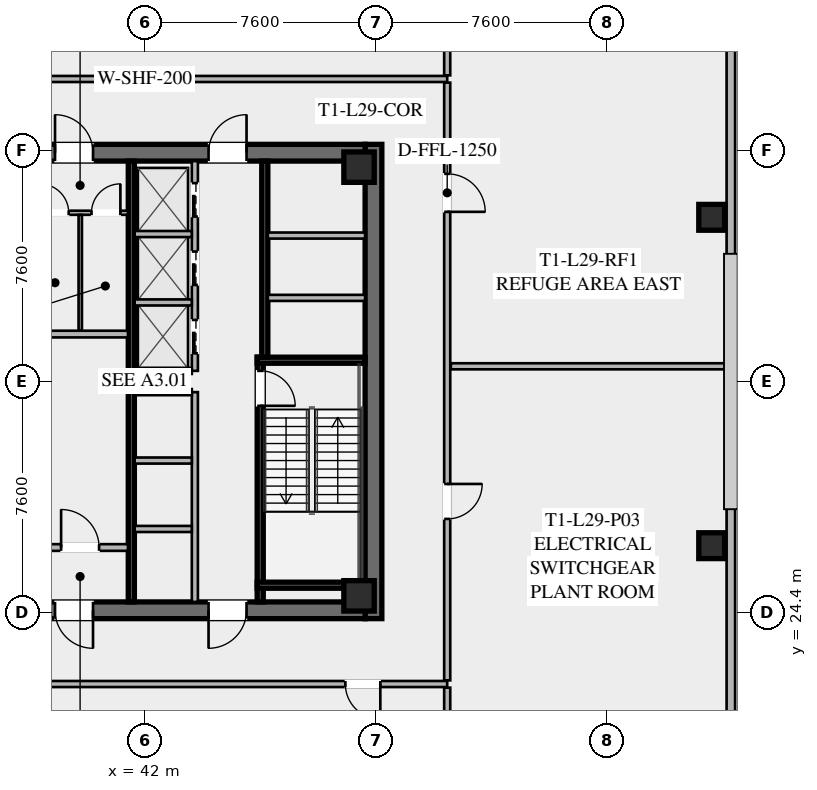
"""IFC4 building model, lengths in metres.
Left out: names, types, materials, properties, quantities, classifications, styles, units other than length and angle.
Written with IfcOpenShell. Run it as: python <this file> out.ifc"""

import sys

from ifc_helpers import new_model, si_unit, direction, frame, frame_2d, origin, origin_2d, place, context, subcontext, project, spatial, rectangle, hollow_rectangle, extrude, element, fill, save


model = new_model("IFC4")
c1 = context("Model", 3, precision=1e-05, world=origin(), true_north=direction((0.0, 1.0)))
c2 = subcontext(c1, "Body", "Model", "MODEL_VIEW")
j1 = project(units=[si_unit("LENGTHUNIT", "METRE"), si_unit("PLANEANGLEUNIT", "RADIAN")], contexts=[c1])
p1 = place(None, origin())
s1 = spatial("IfcSite", under=j1, at=p1, CompositionType="ELEMENT")
p2 = place(p1, origin())
s2 = spatial("IfcBuilding", under=s1, at=p2, CompositionType="ELEMENT")
p3 = place(p2, frame((0.0, 0.0, 109.8)))
s3 = spatial("IfcBuildingStorey", under=s2, at=p3, CompositionType="ELEMENT", Elevation=109.8)
p4 = place(p3, frame((49.525, 39.8, 0.0), z_axis=(0.0, 0.0, 1.0), x_axis=(0.0, -1.0, 0.0)))
e1 = element("IfcWall", 1, at=p4, inside=s3, PredefinedType="SHEAR", context=c2, shape_type="SweptSolid", body=[
    extrude(rectangle(XDim=15.6, YDim=0.55, at=frame_2d((7.8, 0.0))), origin(), (0.0, 0.0, 1.0), 4.6),
])
p5 = place(p3, frame((49.25, 24.475, 0.0), z_axis=(0.0, 0.0, 1.0), x_axis=(-1.0, 0.0, 0.0)))
e2 = element("IfcWall", 2, at=p5, inside=s3, PredefinedType="SHEAR", context=c2, shape_type="SweptSolid", body=[
    extrude(rectangle(XDim=14.5, YDim=0.55, at=frame_2d((7.25, 0.0))), origin(), (0.0, 0.0, 1.0), 4.6),
])
p6 = place(p5, frame((8.95, 0.0, 0.0)))
e3 = element("IfcOpeningElement", 3, at=p6, cuts=e2, PredefinedType="OPENING", context=c2, shape_type="SweptSolid", body=[
    extrude(rectangle(XDim=1.25, YDim=2.25, at=frame_2d((0.625, 1.125))), frame((0.0, 0.285, 0.0), z_axis=(0.0, -1.0, 0.0), x_axis=(1.0, 0.0, 0.0)), (0.0, 0.0, 1.0), 0.57),
])
p7 = place(p5, frame((3.9, 0.0, 0.0)))
e4 = element("IfcOpeningElement", 4, at=p7, cuts=e2, PredefinedType="OPENING", context=c2, shape_type="SweptSolid", body=[
    extrude(rectangle(XDim=1.25, YDim=2.25, at=frame_2d((0.625, 1.125))), frame((0.0, 0.285, 0.0), z_axis=(0.0, -1.0, 0.0), x_axis=(1.0, 0.0, 0.0)), (0.0, 0.0, 1.0), 0.57),
])
p8 = place(p3, frame((34.75, 39.525, 0.0), z_axis=(0.0, 0.0, 1.0), x_axis=(1.0, 0.0, 0.0)))
e5 = element("IfcWall", 5, at=p8, inside=s3, PredefinedType="SHEAR", context=c2, shape_type="SweptSolid", body=[
    extrude(rectangle(XDim=14.5, YDim=0.55, at=frame_2d((7.25, 0.0))), origin(), (0.0, 0.0, 1.0), 4.6),
])
p9 = place(p8, frame((4.3, 0.0, 0.0)))
e6 = element("IfcOpeningElement", 6, at=p9, cuts=e5, PredefinedType="OPENING", context=c2, shape_type="SweptSolid", body=[
    extrude(rectangle(XDim=1.25, YDim=2.25, at=frame_2d((0.625, 1.125))), frame((0.0, 0.285, 0.0), z_axis=(0.0, -1.0, 0.0), x_axis=(1.0, 0.0, 0.0)), (0.0, 0.0, 1.0), 0.57),
])
p10 = place(p8, frame((9.35, 0.0, 0.0)))
e7 = element("IfcOpeningElement", 7, at=p10, cuts=e5, PredefinedType="OPENING", context=c2, shape_type="SweptSolid", body=[
    extrude(rectangle(XDim=1.25, YDim=2.25, at=frame_2d((0.625, 1.125))), frame((0.0, 0.285, 0.0), z_axis=(0.0, -1.0, 0.0), x_axis=(1.0, 0.0, 0.0)), (0.0, 0.0, 1.0), 0.57),
])
for number, where, z_axis, x_axis in (
    (8, (49.05, 24.95, 0.0), (0.0, 0.0, 1.0), (1.0, 0.0, 0.0)),
    (9, (49.05, 39.05, 0.0), (0.0, 0.0, 1.0), (1.0, 0.0, 0.0)),
):
    element("IfcColumn", number, at=place(p3, frame(where, z_axis=z_axis, x_axis=x_axis)), inside=s3, PredefinedType="COLUMN", context=c2, shape_type="SweptSolid", body=[
        extrude(hollow_rectangle(XDim=1.0, YDim=1.0, WallThickness=0.04, at=origin_2d()), origin(), (0.0, 0.0, 1.0), 4.42),
    ])
for number, where, z_axis, x_axis in (
    (10, (60.65, 26.6, -0.295), (0.0, 0.0, 1.0), (1.0, 0.0, 0.0)),
    (11, (60.65, 37.4, -0.295), (0.0, 0.0, 1.0), (1.0, 0.0, 0.0)),
):
    element("IfcColumn", number, at=place(p3, frame(where, z_axis=z_axis, x_axis=x_axis)), inside=s3, PredefinedType="COLUMN", context=c2, shape_type="SweptSolid", body=[
        extrude(hollow_rectangle(XDim=0.85, YDim=0.85, WallThickness=0.035, at=origin_2d()), origin(), (0.0, 0.0, 1.0), 4.715),
    ])
p11 = place(p3, frame((61.28, 48.78, 0.0), z_axis=(0.0, 0.0, 1.0), x_axis=(0.0, -1.0, 0.0)))
e12 = element("IfcWall", 12, at=p11, inside=s3, PredefinedType="SOLIDWALL", context=c2, shape_type="SweptSolid", body=[
    extrude(rectangle(XDim=33.56, YDim=0.28, at=frame_2d((16.78, 0.0))), origin(), (0.0, 0.0, 1.0), 4.42),
])
p12 = place(p3, frame((45.8, 32.8, 0.0), z_axis=(0.0, 0.0, 1.0), x_axis=(0.0, -1.0, 0.0)))
e13 = element("IfcWall", 13, at=p12, inside=s3, PredefinedType="SHEAR", context=c2, shape_type="SweptSolid", body=[
    extrude(rectangle(XDim=8.05, YDim=0.2, at=frame_2d((4.025, 0.0))), origin(), (0.0, 0.0, 1.0), 4.42),
])
p13 = place(p12, frame((0.45, 0.0, 0.0)))
e14 = element("IfcOpeningElement", 14, at=p13, cuts=e13, PredefinedType="OPENING", context=c2, shape_type="SweptSolid", body=[
    extrude(rectangle(XDim=1.15, YDim=2.2, at=frame_2d((0.575, 1.1))), frame((0.0, 0.11, 0.0), z_axis=(0.0, -1.0, 0.0), x_axis=(1.0, 0.0, 0.0)), (0.0, 0.0, 1.0), 0.22),
])
for number, where, z_axis, x_axis in (
    (15, (45.7, 32.7, 0.0), (0.0, 0.0, 1.0), (1.0, 0.0, 0.0)),
    (16, (45.7, 25.3, 0.0), (0.0, 0.0, 1.0), (1.0, 0.0, 0.0)),
):
    element("IfcWall", number, at=place(p3, frame(where, z_axis=z_axis, x_axis=x_axis)), inside=s3, PredefinedType="SHEAR", context=c2, shape_type="SweptSolid", body=[
        extrude(rectangle(XDim=3.55, YDim=0.2, at=frame_2d((1.775, 0.0))), origin(), (0.0, 0.0, 1.0), 4.42),
    ])
p14 = place(p3, frame((41.56, 24.75, 0.0), z_axis=(0.0, 0.0, 1.0), x_axis=(0.0, 1.0, 0.0)))
e17 = element("IfcWall", 17, at=p14, inside=s3, PredefinedType="SHEAR", context=c2, shape_type="SweptSolid", body=[
    extrude(rectangle(XDim=14.5, YDim=0.2, at=frame_2d((7.25, 0.0))), origin(), (0.0, 0.0, 1.0), 4.42),
])
p15 = place(p3, frame((38.3, 33.56, 0.0), z_axis=(0.0, 0.0, 1.0), x_axis=(1.0, 0.0, 0.0)))
e18 = element("IfcWall", 18, at=p15, inside=s3, PredefinedType="SOLIDWALL", context=c2, shape_type="SweptSolid", body=[
    extrude(rectangle(XDim=3.15, YDim=0.22, at=frame_2d((1.575, 0.0))), origin(), (0.0, 0.0, 1.0), 3.531),
])
p16 = place(p3, frame((38.3, 26.54, 0.0), z_axis=(0.0, 0.0, 1.0), x_axis=(1.0, 0.0, 0.0)))
e19 = element("IfcWall", 19, at=p16, inside=s3, PredefinedType="SOLIDWALL", context=c2, shape_type="SweptSolid", body=[
    extrude(rectangle(XDim=3.15, YDim=0.22, at=frame_2d((1.575, 0.0))), origin(), (0.0, 0.0, 1.0), 3.531),
])
p17 = place(p16, frame((0.95, 0.0, 0.0)))
e20 = element("IfcOpeningElement", 20, at=p17, cuts=e19, PredefinedType="OPENING", context=c2, shape_type="SweptSolid", body=[
    extrude(rectangle(XDim=1.25, YDim=2.25, at=frame_2d((0.625, 1.125))), frame((0.0, 0.12, 0.0), z_axis=(0.0, -1.0, 0.0), x_axis=(1.0, 0.0, 0.0)), (0.0, 0.0, 1.0), 0.24),
])
p18 = place(p3, frame((45.95, 39.25, 0.0), z_axis=(0.0, 0.0, 1.0), x_axis=(0.0, -1.0, 0.0)))
e21 = element("IfcWall", 21, at=p18, inside=s3, PredefinedType="SHEAR", context=c2, shape_type="SweptSolid", body=[
    extrude(rectangle(XDim=6.45, YDim=0.2, at=frame_2d((3.225, 0.0))), origin(), (0.0, 0.0, 1.0), 4.42),
])
for number, where, z_axis, x_axis in (
    (22, (46.05, 34.75, 0.0), (0.0, 0.0, 1.0), (1.0, 0.0, 0.0)),
    (23, (46.05, 36.8, 0.0), (0.0, 0.0, 1.0), (1.0, 0.0, 0.0)),
):
    element("IfcWall", number, at=place(p3, frame(where, z_axis=z_axis, x_axis=x_axis)), inside=s3, PredefinedType="SOLIDWALL", context=c2, shape_type="SweptSolid", body=[
        extrude(rectangle(XDim=3.2, YDim=0.2, at=frame_2d((1.6, 0.0))), origin(), (0.0, 0.0, 1.0), 4.42),
    ])
p19 = place(p3, frame((38.3, 37.55, 0.0), z_axis=(0.0, 0.0, 1.0), x_axis=(1.0, 0.0, 0.0)))
e24 = element("IfcWall", 24, at=p19, inside=s3, PredefinedType="PARTITIONING", context=c2, shape_type="SweptSolid", body=[
    extrude(rectangle(XDim=3.15, YDim=0.135, at=frame_2d((1.575, 0.0))), origin(), (0.0, 0.0, 1.0), 3.531),
])
p20 = place(p19, frame((0.25, 0.0, 0.0)))
e25 = element("IfcOpeningElement", 25, at=p20, cuts=e24, PredefinedType="OPENING", context=c2, shape_type="SweptSolid", body=[
    extrude(rectangle(XDim=0.95, YDim=2.05, at=frame_2d((0.475, 1.025))), frame((0.0, 0.077, 0.0), z_axis=(0.0, -1.0, 0.0), x_axis=(1.0, 0.0, 0.0)), (0.0, 0.0, 1.0), 0.155),
])
p21 = place(p19, frame((1.95, 0.0, 0.0)))
e26 = element("IfcOpeningElement", 26, at=p21, cuts=e24, PredefinedType="OPENING", context=c2, shape_type="SweptSolid", body=[
    extrude(rectangle(XDim=0.95, YDim=2.05, at=frame_2d((0.475, 1.025))), frame((0.0, 0.077, 0.0), z_axis=(0.0, -1.0, 0.0), x_axis=(1.0, 0.0, 0.0)), (0.0, 0.0, 1.0), 0.155),
])
p22 = place(p3, frame((39.88, 33.68, 0.0), z_axis=(0.0, 0.0, 1.0), x_axis=(0.0, 1.0, 0.0)))
e27 = element("IfcWall", 27, at=p22, inside=s3, PredefinedType="PARTITIONING", context=c2, shape_type="SweptSolid", body=[
    extrude(rectangle(XDim=3.8, YDim=0.11, at=frame_2d((1.9, 0.0))), origin(), (0.0, 0.0, 1.0), 3.531),
])
p23 = place(p3, frame((43.65, 24.75, 0.0), z_axis=(0.0, 0.0, 1.0), x_axis=(0.0, 1.0, 0.0)))
e28 = element("IfcWall", 28, at=p23, inside=s3, PredefinedType="SOLIDWALL", context=c2, shape_type="SweptSolid", body=[
    extrude(rectangle(XDim=6.9, YDim=0.2, at=frame_2d((3.45, 0.0))), origin(), (0.0, 0.0, 1.0), 4.42),
])
for number, where, z_axis, x_axis in (
    (29, (41.67, 27.15, 0.0), (0.0, 0.0, 1.0), (1.0, 0.0, 0.0)),
    (30, (41.67, 29.4, 0.0), (0.0, 0.0, 1.0), (1.0, 0.0, 0.0)),
    (31, (41.67, 31.65, 0.0), (0.0, 0.0, 1.0), (1.0, 0.0, 0.0)),
):
    element("IfcWall", number, at=place(p3, frame(where, z_axis=z_axis, x_axis=x_axis)), inside=s3, PredefinedType="SOLIDWALL", context=c2, shape_type="SweptSolid", body=[
        extrude(rectangle(XDim=1.88, YDim=0.2, at=frame_2d((0.94, 0.0))), origin(), (0.0, 0.0, 1.0), 4.42),
    ])
p24 = place(p3, frame((43.65, 32.35, 0.0), z_axis=(0.0, 0.0, 1.0), x_axis=(0.0, 1.0, 0.0)))
e32 = element("IfcWall", 32, at=p24, inside=s3, PredefinedType="SOLIDWALL", context=c2, shape_type="SweptSolid", body=[
    extrude(rectangle(XDim=6.9, YDim=0.2, at=frame_2d((3.45, 0.0))), origin(), (0.0, 0.0, 1.0), 4.42),
])
p25 = place(p24, frame((0.575, 0.0, 0.0)))
e33 = element("IfcOpeningElement", 33, at=p25, cuts=e32, PredefinedType="OPENING", context=c2, shape_type="SweptSolid", body=[
    extrude(rectangle(XDim=1.1, YDim=2.2, at=frame_2d((0.55, 1.1))), frame((0.0, 0.11, 0.0), z_axis=(0.0, -1.0, 0.0), x_axis=(1.0, 0.0, 0.0)), (0.0, 0.0, 1.0), 0.22),
])
p26 = place(p24, frame((2.825, 0.0, 0.0)))
e34 = element("IfcOpeningElement", 34, at=p26, cuts=e32, PredefinedType="OPENING", context=c2, shape_type="SweptSolid", body=[
    extrude(rectangle(XDim=1.1, YDim=2.2, at=frame_2d((0.55, 1.1))), frame((0.0, 0.11, 0.0), z_axis=(0.0, -1.0, 0.0), x_axis=(1.0, 0.0, 0.0)), (0.0, 0.0, 1.0), 0.22),
])
p27 = place(p24, frame((5.075, 0.0, 0.0)))
e35 = element("IfcOpeningElement", 35, at=p27, cuts=e32, PredefinedType="OPENING", context=c2, shape_type="SweptSolid", body=[
    extrude(rectangle(XDim=1.1, YDim=2.2, at=frame_2d((0.55, 1.1))), frame((0.0, 0.11, 0.0), z_axis=(0.0, -1.0, 0.0), x_axis=(1.0, 0.0, 0.0)), (0.0, 0.0, 1.0), 0.22),
])
for number, where, z_axis, x_axis in (
    (36, (41.67, 32.35, 0.0), (0.0, 0.0, 1.0), (1.0, 0.0, 0.0)),
    (37, (41.67, 34.6, 0.0), (0.0, 0.0, 1.0), (1.0, 0.0, 0.0)),
    (38, (41.67, 36.85, 0.0), (0.0, 0.0, 1.0), (1.0, 0.0, 0.0)),
):
    element("IfcWall", number, at=place(p3, frame(where, z_axis=z_axis, x_axis=x_axis)), inside=s3, PredefinedType="SOLIDWALL", context=c2, shape_type="SweptSolid", body=[
        extrude(rectangle(XDim=1.88, YDim=0.2, at=frame_2d((0.94, 0.0))), origin(), (0.0, 0.0, 1.0), 4.42),
    ])
p28 = place(p3, frame((32.05, 41.95, 0.0), z_axis=(0.0, 0.0, 1.0), x_axis=(1.0, 0.0, 0.0)))
e39 = element("IfcWall", 39, at=p28, inside=s3, PredefinedType="SOLIDWALL", context=c2, shape_type="SweptSolid", body=[
    extrude(rectangle(XDim=19.9, YDim=0.2, at=frame_2d((9.95, 0.0))), origin(), (0.0, 0.0, 1.0), 3.531),
])
p29 = place(p28, frame((2.2, 0.0, 0.0)))
e40 = element("IfcOpeningElement", 40, at=p29, cuts=e39, PredefinedType="OPENING", context=c2, shape_type="SweptSolid", body=[
    extrude(rectangle(XDim=1.15, YDim=2.2, at=frame_2d((0.575, 1.1))), frame((0.0, 0.11, 0.0), z_axis=(0.0, -1.0, 0.0), x_axis=(1.0, 0.0, 0.0)), (0.0, 0.0, 1.0), 0.22),
])
p30 = place(p3, frame((51.95, 22.05, 0.0), z_axis=(0.0, 0.0, 1.0), x_axis=(-1.0, 0.0, 0.0)))
e41 = element("IfcWall", 41, at=p30, inside=s3, PredefinedType="SOLIDWALL", context=c2, shape_type="SweptSolid", body=[
    extrude(rectangle(XDim=19.9, YDim=0.2, at=frame_2d((9.95, 0.0))), origin(), (0.0, 0.0, 1.0), 3.531),
])
p31 = place(p30, frame((2.2, 0.0, 0.0)))
e42 = element("IfcOpeningElement", 42, at=p31, cuts=e41, PredefinedType="OPENING", context=c2, shape_type="SweptSolid", body=[
    extrude(rectangle(XDim=1.15, YDim=2.2, at=frame_2d((0.575, 1.1))), frame((0.0, 0.11, 0.0), z_axis=(0.0, -1.0, 0.0), x_axis=(1.0, 0.0, 0.0)), (0.0, 0.0, 1.0), 0.22),
])
p32 = place(p3, frame((51.95, 41.83, 0.0), z_axis=(0.0, 0.0, 1.0), x_axis=(0.0, -1.0, 0.0)))
e43 = element("IfcWall", 43, at=p32, inside=s3, PredefinedType="SOLIDWALL", context=c2, shape_type="SweptSolid", body=[
    extrude(rectangle(XDim=19.66, YDim=0.2, at=frame_2d((9.83, 0.0))), origin(), (0.0, 0.0, 1.0), 3.531),
])
p33 = place(p32, frame((3.0, 0.0, 0.0)))
e44 = element("IfcOpeningElement", 44, at=p33, cuts=e43, PredefinedType="OPENING", context=c2, shape_type="SweptSolid", body=[
    extrude(rectangle(XDim=1.25, YDim=2.25, at=frame_2d((0.625, 1.125))), frame((0.0, 0.11, 0.0), z_axis=(0.0, -1.0, 0.0), x_axis=(1.0, 0.0, 0.0)), (0.0, 0.0, 1.0), 0.22),
])
p34 = place(p32, frame((13.2, 0.0, 0.0)))
e45 = element("IfcOpeningElement", 45, at=p34, cuts=e43, PredefinedType="OPENING", context=c2, shape_type="SweptSolid", body=[
    extrude(rectangle(XDim=1.15, YDim=2.2, at=frame_2d((0.575, 1.1))), frame((0.0, 0.11, 0.0), z_axis=(0.0, -1.0, 0.0), x_axis=(1.0, 0.0, 0.0)), (0.0, 0.0, 1.0), 0.22),
])
for number, where, z_axis, x_axis in (
    (46, (51.95, 42.07, 0.0), (0.0, 0.0, 1.0), (0.0, 1.0, 0.0)),
    (47, (51.95, 21.93, 0.0), (0.0, 0.0, 1.0), (0.0, -1.0, 0.0)),
    (48, (52.07, 32.5, 0.0), (0.0, 0.0, 1.0), (1.0, 0.0, 0.0)),
):
    element("IfcWall", number, at=place(p3, frame(where, z_axis=z_axis, x_axis=x_axis)), inside=s3, PredefinedType="SOLIDWALL", context=c2, shape_type="SweptSolid", body=[
        extrude(rectangle(XDim=9.21, YDim=0.2, at=frame_2d((4.605, 0.0))), origin(), (0.0, 0.0, 1.0), 3.531),
    ])
p35 = place(p9, origin())
e49 = element("IfcDoor", 49, at=p35, inside=s3, OperationType="SINGLE_SWING_LEFT", PredefinedType="DOOR", context=c2, shape_type="SweptSolid", body=[
    extrude(rectangle(XDim=1.25, YDim=2.25, at=frame_2d((0.625, 1.125))), frame((0.0, 0.025, 0.0), z_axis=(0.0, -1.0, 0.0), x_axis=(1.0, 0.0, 0.0)), (0.0, 0.0, 1.0), 0.05),
])
fill(e6, e49)
p36 = place(p10, origin())
e50 = element("IfcDoor", 50, at=p36, inside=s3, OperationType="SINGLE_SWING_RIGHT", PredefinedType="DOOR", context=c2, shape_type="SweptSolid", body=[
    extrude(rectangle(XDim=1.25, YDim=2.25, at=frame_2d((0.625, 1.125))), frame((0.0, 0.025, 0.0), z_axis=(0.0, -1.0, 0.0), x_axis=(1.0, 0.0, 0.0)), (0.0, 0.0, 1.0), 0.05),
])
fill(e7, e50)
p37 = place(p6, origin())
e51 = element("IfcDoor", 51, at=p37, inside=s3, OperationType="SINGLE_SWING_LEFT", PredefinedType="DOOR", context=c2, shape_type="SweptSolid", body=[
    extrude(rectangle(XDim=1.25, YDim=2.25, at=frame_2d((0.625, 1.125))), frame((0.0, 0.025, 0.0), z_axis=(0.0, -1.0, 0.0), x_axis=(1.0, 0.0, 0.0)), (0.0, 0.0, 1.0), 0.05),
])
fill(e3, e51)
p38 = place(p7, origin())
e52 = element("IfcDoor", 52, at=p38, inside=s3, OperationType="SINGLE_SWING_RIGHT", PredefinedType="DOOR", context=c2, shape_type="SweptSolid", body=[
    extrude(rectangle(XDim=1.25, YDim=2.25, at=frame_2d((0.625, 1.125))), frame((0.0, 0.025, 0.0), z_axis=(0.0, -1.0, 0.0), x_axis=(1.0, 0.0, 0.0)), (0.0, 0.0, 1.0), 0.05),
])
fill(e4, e52)
p39 = place(p13, origin())
e53 = element("IfcDoor", 53, at=p39, inside=s3, OperationType="SINGLE_SWING_RIGHT", PredefinedType="DOOR", context=c2, shape_type="SweptSolid", body=[
    extrude(rectangle(XDim=1.15, YDim=2.2, at=frame_2d((0.575, 1.1))), frame((0.0, 0.025, 0.0), z_axis=(0.0, -1.0, 0.0), x_axis=(1.0, 0.0, 0.0)), (0.0, 0.0, 1.0), 0.05),
])
fill(e14, e53)
p40 = place(p17, origin())
e54 = element("IfcDoor", 54, at=p40, inside=s3, OperationType="SINGLE_SWING_LEFT", PredefinedType="DOOR", context=c2, shape_type="SweptSolid", body=[
    extrude(rectangle(XDim=1.25, YDim=2.25, at=frame_2d((0.625, 1.125))), frame((0.0, 0.025, 0.0), z_axis=(0.0, -1.0, 0.0), x_axis=(1.0, 0.0, 0.0)), (0.0, 0.0, 1.0), 0.05),
])
fill(e20, e54)
p41 = place(p20, origin())
e55 = element("IfcDoor", 55, at=p41, inside=s3, OperationType="SINGLE_SWING_LEFT", PredefinedType="DOOR", context=c2, shape_type="SweptSolid", body=[
    extrude(rectangle(XDim=0.95, YDim=2.05, at=frame_2d((0.475, 1.025))), frame((0.0, 0.025, 0.0), z_axis=(0.0, -1.0, 0.0), x_axis=(1.0, 0.0, 0.0)), (0.0, 0.0, 1.0), 0.05),
])
fill(e25, e55)
p42 = place(p21, origin())
e56 = element("IfcDoor", 56, at=p42, inside=s3, OperationType="SINGLE_SWING_RIGHT", PredefinedType="DOOR", context=c2, shape_type="SweptSolid", body=[
    extrude(rectangle(XDim=0.95, YDim=2.05, at=frame_2d((0.475, 1.025))), frame((0.0, 0.025, 0.0), z_axis=(0.0, -1.0, 0.0), x_axis=(1.0, 0.0, 0.0)), (0.0, 0.0, 1.0), 0.05),
])
fill(e26, e56)
p43 = place(p31, origin())
e57 = element("IfcDoor", 57, at=p43, inside=s3, OperationType="SINGLE_SWING_LEFT", PredefinedType="DOOR", context=c2, shape_type="SweptSolid", body=[
    extrude(rectangle(XDim=1.15, YDim=2.2, at=frame_2d((0.575, 1.1))), frame((0.0, 0.025, 0.0), z_axis=(0.0, -1.0, 0.0), x_axis=(1.0, 0.0, 0.0)), (0.0, 0.0, 1.0), 0.05),
])
fill(e42, e57)
p44 = place(p33, origin())
e58 = element("IfcDoor", 58, at=p44, inside=s3, OperationType="SINGLE_SWING_RIGHT", PredefinedType="DOOR", context=c2, shape_type="SweptSolid", body=[
    extrude(rectangle(XDim=1.25, YDim=2.25, at=frame_2d((0.625, 1.125))), frame((0.0, 0.025, 0.0), z_axis=(0.0, -1.0, 0.0), x_axis=(1.0, 0.0, 0.0)), (0.0, 0.0, 1.0), 0.05),
])
fill(e44, e58)
p45 = place(p34, origin())
e59 = element("IfcDoor", 59, at=p45, inside=s3, OperationType="SINGLE_SWING_LEFT", PredefinedType="DOOR", context=c2, shape_type="SweptSolid", body=[
    extrude(rectangle(XDim=1.15, YDim=2.2, at=frame_2d((0.575, 1.1))), frame((0.0, 0.025, 0.0), z_axis=(0.0, -1.0, 0.0), x_axis=(1.0, 0.0, 0.0)), (0.0, 0.0, 1.0), 0.05),
])
fill(e45, e59)
p46 = place(p25, origin())
e60 = element("IfcDoor", 60, at=p46, inside=s3, OperationType="SLIDING_TO_LEFT", PredefinedType="DOOR", context=c2, shape_type="SweptSolid", body=[
    extrude(rectangle(XDim=1.1, YDim=2.2, at=frame_2d((0.55, 1.1))), frame((0.0, 0.025, 0.0), z_axis=(0.0, -1.0, 0.0), x_axis=(1.0, 0.0, 0.0)), (0.0, 0.0, 1.0), 0.05),
])
fill(e33, e60)
p47 = place(p26, origin())
e61 = element("IfcDoor", 61, at=p47, inside=s3, OperationType="SLIDING_TO_LEFT", PredefinedType="DOOR", context=c2, shape_type="SweptSolid", body=[
    extrude(rectangle(XDim=1.1, YDim=2.2, at=frame_2d((0.55, 1.1))), frame((0.0, 0.025, 0.0), z_axis=(0.0, -1.0, 0.0), x_axis=(1.0, 0.0, 0.0)), (0.0, 0.0, 1.0), 0.05),
])
fill(e34, e61)
p48 = place(p27, origin())
e62 = element("IfcDoor", 62, at=p48, inside=s3, OperationType="SLIDING_TO_LEFT", PredefinedType="DOOR", context=c2, shape_type="SweptSolid", body=[
    extrude(rectangle(XDim=1.1, YDim=2.2, at=frame_2d((0.55, 1.1))), frame((0.0, 0.025, 0.0), z_axis=(0.0, -1.0, 0.0), x_axis=(1.0, 0.0, 0.0)), (0.0, 0.0, 1.0), 0.05),
])
fill(e35, e62)
save(model, sys.argv[1])
